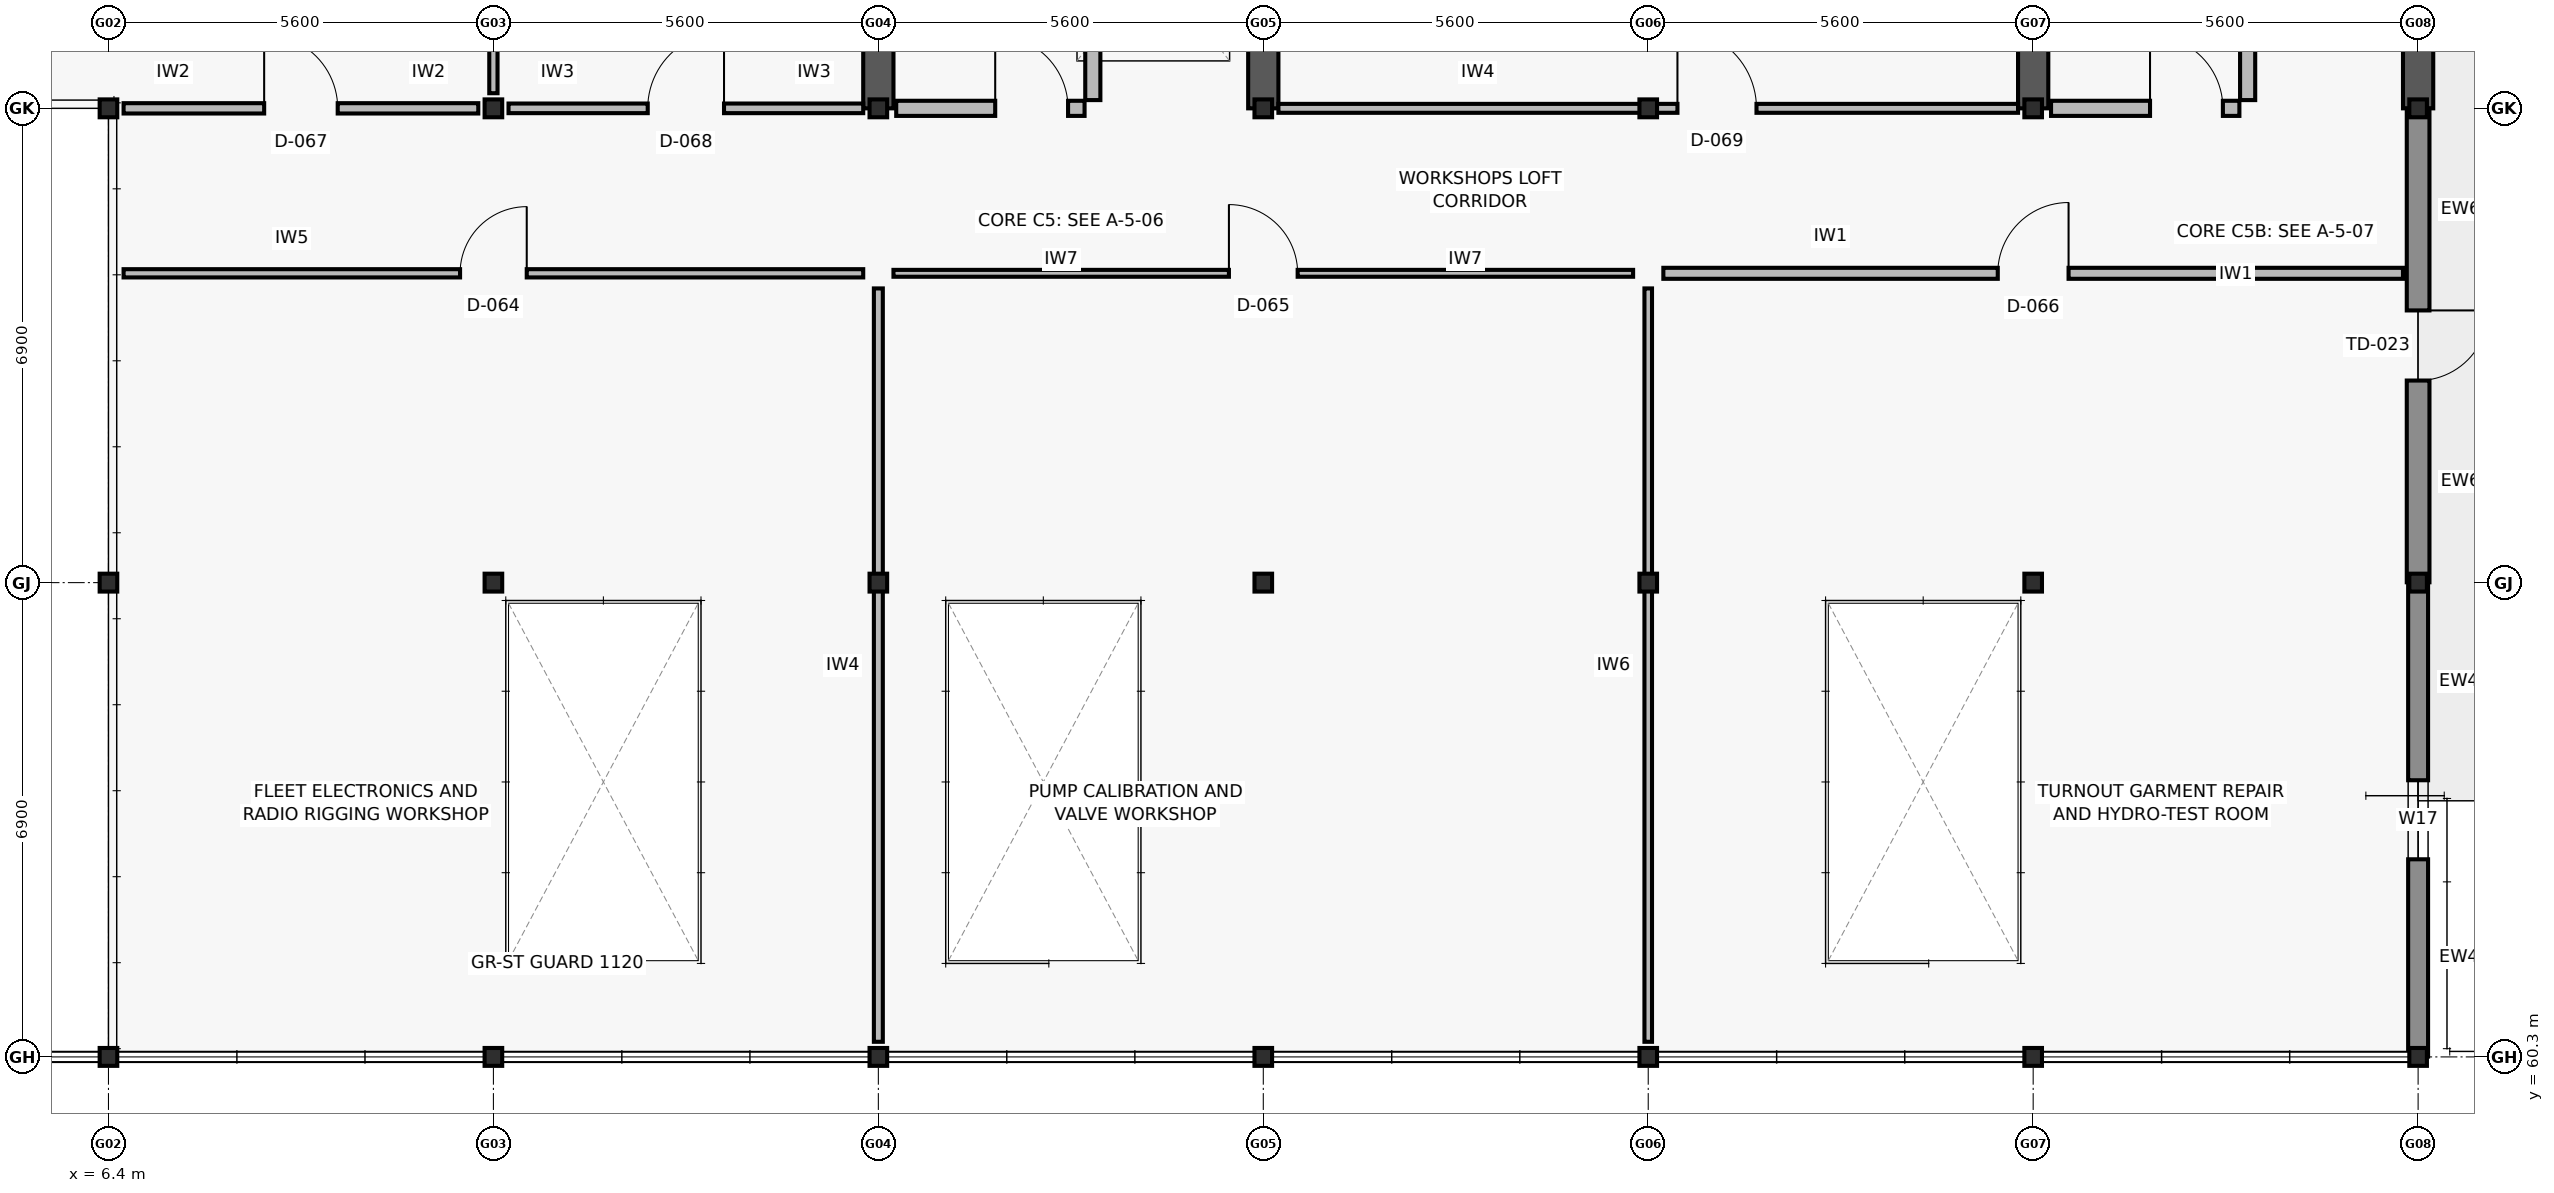
"""IFC4 building model, lengths in metres.
Left out: names, types, materials, properties, quantities, classifications, styles, units other than length and angle.
Written with IfcOpenShell. Run it as: python <this file> out.ifc"""

import sys

from ifc_helpers import new_model, si_unit, direction, frame, frame_2d, origin, origin_2d, place, context, subcontext, project, spatial, rectangle, i_section, extrude, element, fill, save


model = new_model("IFC4")
c1 = context("Model", 3, precision=1e-05, world=origin(), true_north=direction((0.0, 1.0)))
c2 = subcontext(c1, "Body", "Model", "MODEL_VIEW")
j1 = project(units=[si_unit("LENGTHUNIT", "METRE"), si_unit("PLANEANGLEUNIT", "RADIAN")], contexts=[c1])
p1 = place(None, origin())
s1 = spatial("IfcSite", under=j1, at=p1, CompositionType="ELEMENT")
p2 = place(p1, origin())
s2 = spatial("IfcBuilding", under=s1, at=p2, CompositionType="ELEMENT")
p3 = place(p2, frame((0.0, 0.0, 5.4)))
s3 = spatial("IfcBuildingStorey", under=s2, at=p3, CompositionType="ELEMENT", Elevation=5.4)
for number, where, z_axis, x_axis in (
    (1, (6.4, 60.3, 0.0), (0.0, 0.0, 1.0), (1.0, 0.0, 0.0)),
    (2, (6.4, 67.2, 0.0), (0.0, 0.0, 1.0), (1.0, 0.0, 0.0)),
    (3, (6.4, 74.1, 0.0), (0.0, 0.0, 1.0), (1.0, 0.0, 0.0)),
    (4, (12.0, 60.3, 0.0), (0.0, 0.0, 1.0), (1.0, 0.0, 0.0)),
    (5, (12.0, 67.2, 0.0), (0.0, 0.0, 1.0), (1.0, 0.0, 0.0)),
    (6, (12.0, 74.1, 0.0), (0.0, 0.0, 1.0), (1.0, 0.0, 0.0)),
    (7, (17.6, 60.3, 0.0), (0.0, 0.0, 1.0), (1.0, 0.0, 0.0)),
    (8, (17.6, 67.2, 0.0), (0.0, 0.0, 1.0), (1.0, 0.0, 0.0)),
    (9, (17.6, 74.1, 0.0), (0.0, 0.0, 1.0), (1.0, 0.0, 0.0)),
    (10, (23.2, 60.3, 0.0), (0.0, 0.0, 1.0), (1.0, 0.0, 0.0)),
    (11, (23.2, 67.2, 0.0), (0.0, 0.0, 1.0), (1.0, 0.0, 0.0)),
    (12, (23.2, 74.1, 0.0), (0.0, 0.0, 1.0), (1.0, 0.0, 0.0)),
    (13, (28.8, 60.3, 0.0), (0.0, 0.0, 1.0), (1.0, 0.0, 0.0)),
    (14, (28.8, 67.2, 0.0), (0.0, 0.0, 1.0), (1.0, 0.0, 0.0)),
    (15, (28.8, 74.1, 0.0), (0.0, 0.0, 1.0), (1.0, 0.0, 0.0)),
    (16, (34.4, 60.3, 0.0), (0.0, 0.0, 1.0), (1.0, 0.0, 0.0)),
    (17, (34.4, 67.2, 0.0), (0.0, 0.0, 1.0), (1.0, 0.0, 0.0)),
    (18, (34.4, 74.1, 0.0), (0.0, 0.0, 1.0), (1.0, 0.0, 0.0)),
    (19, (40.0, 60.3, 0.0), (0.0, 0.0, 1.0), (1.0, 0.0, 0.0)),
    (20, (40.0, 67.2, 0.0), (0.0, 0.0, 1.0), (1.0, 0.0, 0.0)),
    (21, (40.0, 74.1, 0.0), (0.0, 0.0, 1.0), (1.0, 0.0, 0.0)),
):
    element("IfcColumn", number, at=place(p3, frame(where, z_axis=z_axis, x_axis=x_axis)), inside=s3, PredefinedType="COLUMN", context=c2, shape_type="SweptSolid", body=[
        extrude(i_section(OverallWidth=0.256, OverallDepth=0.26, WebThickness=0.01, FlangeThickness=0.017, FilletRadius=0.013, at=origin_2d()), origin(), (0.0, 0.0, 1.0), 4.2),
    ])
for number, where, z_axis, x_axis in (
    (22, (17.6, 74.1, 0.0), (0.0, 0.0, 1.0), (0.0, 1.0, 0.0)),
    (23, (23.2, 74.1, 0.0), (0.0, 0.0, 1.0), (0.0, 1.0, 0.0)),
    (24, (34.4, 74.1, 0.0), (0.0, 0.0, 1.0), (0.0, 1.0, 0.0)),
    (25, (40.0, 74.1, 0.0), (0.0, 0.0, 1.0), (0.0, 1.0, 0.0)),
):
    element("IfcWall", number, at=place(p3, frame(where, z_axis=z_axis, x_axis=x_axis)), inside=s3, PredefinedType="SHEAR", context=c2, shape_type="SweptSolid", body=[
        extrude(rectangle(XDim=6.68, YDim=0.44, at=frame_2d((3.34, 0.0))), origin(), (0.0, 0.0, 1.0), 3.96),
    ])
p4 = place(p3, frame((40.0, 67.195, 0.0), z_axis=(0.0, 0.0, 1.0), x_axis=(0.0, -1.0, 0.0)))
e26 = element("IfcWall", 26, at=p4, inside=s3, PredefinedType="SOLIDWALL", context=c2, shape_type="SweptSolid", body=[
    extrude(rectangle(XDim=6.89, YDim=0.29, at=frame_2d((3.445, 0.0))), origin(), (0.0, 0.0, 1.0), 3.32),
])
p5 = place(p4, frame((2.87, 0.0, 0.8)))
e27 = element("IfcOpeningElement", 27, at=p5, cuts=e26, PredefinedType="OPENING", context=c2, shape_type="SweptSolid", body=[
    extrude(rectangle(XDim=1.15, YDim=1.8, at=frame_2d((0.575, 0.9))), frame((0.0, 0.155, 0.0), z_axis=(0.0, -1.0, 0.0), x_axis=(1.0, 0.0, 0.0)), (0.0, 0.0, 1.0), 0.31),
])
p6 = place(p3, frame((40.0, 74.095, 0.0), z_axis=(0.0, 0.0, 1.0), x_axis=(0.0, -1.0, 0.0)))
e28 = element("IfcWall", 28, at=p6, inside=s3, PredefinedType="SOLIDWALL", context=c2, shape_type="SweptSolid", body=[
    extrude(rectangle(XDim=6.89, YDim=0.33, at=frame_2d((3.445, 0.0))), origin(), (0.0, 0.0, 1.0), 3.32),
])
p7 = place(p6, frame((2.935, 0.0, 0.0)))
e29 = element("IfcOpeningElement", 29, at=p7, cuts=e28, PredefinedType="OPENING", context=c2, shape_type="SweptSolid", body=[
    extrude(rectangle(XDim=1.02, YDim=2.14, at=frame_2d((0.51, 1.07))), frame((0.0, 0.175, 0.0), z_axis=(0.0, -1.0, 0.0), x_axis=(1.0, 0.0, 0.0)), (0.0, 0.0, 1.0), 0.35),
])
p8 = place(p3, frame((20.72, 74.22, 0.0), z_axis=(0.0, 0.0, 1.0), x_axis=(0.0, 1.0, 0.0)))
e30 = element("IfcWall", 30, at=p8, inside=s3, PredefinedType="SOLIDWALL", context=c2, shape_type="SweptSolid", body=[
    extrude(rectangle(XDim=6.555, YDim=0.22, at=frame_2d((3.277, 0.0))), origin(), (0.0, 0.0, 1.0), 3.96),
])
p9 = place(p3, frame((17.86, 74.1, 0.0), z_axis=(0.0, 0.0, 1.0), x_axis=(1.0, 0.0, 0.0)))
e31 = element("IfcWall", 31, at=p9, inside=s3, PredefinedType="SOLIDWALL", context=c2, shape_type="SweptSolid", body=[
    extrude(rectangle(XDim=2.74, YDim=0.22, at=frame_2d((1.37, 0.0))), origin(), (0.0, 0.0, 1.0), 3.32),
])
p10 = place(p9, frame((1.44, 0.0, 0.0)))
e32 = element("IfcOpeningElement", 32, at=p10, cuts=e31, PredefinedType="OPENING", context=c2, shape_type="SweptSolid", body=[
    extrude(rectangle(XDim=1.06, YDim=2.1, at=frame_2d((0.53, 1.05))), frame((0.0, 0.12, 0.0), z_axis=(0.0, -1.0, 0.0), x_axis=(1.0, 0.0, 0.0)), (0.0, 0.0, 1.0), 0.24),
])
p11 = place(p3, frame((37.52, 74.22, 0.0), z_axis=(0.0, 0.0, 1.0), x_axis=(0.0, 1.0, 0.0)))
e33 = element("IfcWall", 33, at=p11, inside=s3, PredefinedType="SOLIDWALL", context=c2, shape_type="SweptSolid", body=[
    extrude(rectangle(XDim=6.555, YDim=0.22, at=frame_2d((3.277, 0.0))), origin(), (0.0, 0.0, 1.0), 3.96),
])
p12 = place(p3, frame((34.66, 74.1, 0.0), z_axis=(0.0, 0.0, 1.0), x_axis=(1.0, 0.0, 0.0)))
e34 = element("IfcWall", 34, at=p12, inside=s3, PredefinedType="SOLIDWALL", context=c2, shape_type="SweptSolid", body=[
    extrude(rectangle(XDim=2.74, YDim=0.22, at=frame_2d((1.37, 0.0))), origin(), (0.0, 0.0, 1.0), 3.32),
])
p13 = place(p12, frame((1.44, 0.0, 0.0)))
e35 = element("IfcOpeningElement", 35, at=p13, cuts=e34, PredefinedType="OPENING", context=c2, shape_type="SweptSolid", body=[
    extrude(rectangle(XDim=1.06, YDim=2.1, at=frame_2d((0.53, 1.05))), frame((0.0, 0.12, 0.0), z_axis=(0.0, -1.0, 0.0), x_axis=(1.0, 0.0, 0.0)), (0.0, 0.0, 1.0), 0.24),
])
p14 = place(p3, frame((17.6, 60.52, 0.0), z_axis=(0.0, 0.0, 1.0), x_axis=(0.0, 1.0, 0.0)))
e36 = element("IfcWall", 36, at=p14, inside=s3, PredefinedType="PARTITIONING", context=c2, shape_type="SweptSolid", body=[
    extrude(rectangle(XDim=10.96, YDim=0.13, at=frame_2d((5.48, 0.0))), origin(), (0.0, 0.0, 1.0), 3.3),
])
p15 = place(p3, frame((6.62, 71.7, 0.0), z_axis=(0.0, 0.0, 1.0), x_axis=(1.0, 0.0, 0.0)))
e37 = element("IfcWall", 37, at=p15, inside=s3, PredefinedType="PARTITIONING", context=c2, shape_type="SweptSolid", body=[
    extrude(rectangle(XDim=10.76, YDim=0.12, at=frame_2d((5.38, 0.0))), origin(), (0.0, 0.0, 1.0), 3.3),
])
p16 = place(p15, frame((4.895, 0.0, 0.0)))
e38 = element("IfcOpeningElement", 38, at=p16, cuts=e37, PredefinedType="OPENING", context=c2, shape_type="SweptSolid", body=[
    extrude(rectangle(XDim=0.97, YDim=2.1, at=frame_2d((0.485, 1.05))), frame((0.0, 0.07, 0.0), z_axis=(0.0, -1.0, 0.0), x_axis=(1.0, 0.0, 0.0)), (0.0, 0.0, 1.0), 0.14),
])
p17 = place(p3, frame((28.8, 60.52, 0.0), z_axis=(0.0, 0.0, 1.0), x_axis=(0.0, 1.0, 0.0)))
e39 = element("IfcWall", 39, at=p17, inside=s3, PredefinedType="PARTITIONING", context=c2, shape_type="SweptSolid", body=[
    extrude(rectangle(XDim=10.96, YDim=0.11, at=frame_2d((5.48, 0.0))), origin(), (0.0, 0.0, 1.0), 3.3),
])
p18 = place(p3, frame((17.82, 71.7, 0.0), z_axis=(0.0, 0.0, 1.0), x_axis=(1.0, 0.0, 0.0)))
e40 = element("IfcWall", 40, at=p18, inside=s3, PredefinedType="PARTITIONING", context=c2, shape_type="SweptSolid", body=[
    extrude(rectangle(XDim=10.76, YDim=0.1, at=frame_2d((5.38, 0.0))), origin(), (0.0, 0.0, 1.0), 3.3),
])
p19 = place(p18, frame((4.88, 0.0, 0.0)))
e41 = element("IfcOpeningElement", 41, at=p19, cuts=e40, PredefinedType="OPENING", context=c2, shape_type="SweptSolid", body=[
    extrude(rectangle(XDim=1.0, YDim=2.12, at=frame_2d((0.5, 1.06))), frame((0.0, 0.06, 0.0), z_axis=(0.0, -1.0, 0.0), x_axis=(1.0, 0.0, 0.0)), (0.0, 0.0, 1.0), 0.12),
])
p20 = place(p3, frame((29.02, 71.7, 0.0), z_axis=(0.0, 0.0, 1.0), x_axis=(1.0, 0.0, 0.0)))
e42 = element("IfcWall", 42, at=p20, inside=s3, PredefinedType="PARTITIONING", context=c2, shape_type="SweptSolid", body=[
    extrude(rectangle(XDim=10.76, YDim=0.16, at=frame_2d((5.38, 0.0))), origin(), (0.0, 0.0, 1.0), 3.3),
])
p21 = place(p20, frame((4.865, 0.0, 0.0)))
e43 = element("IfcOpeningElement", 43, at=p21, cuts=e42, PredefinedType="OPENING", context=c2, shape_type="SweptSolid", body=[
    extrude(rectangle(XDim=1.03, YDim=2.06, at=frame_2d((0.515, 1.03))), frame((0.0, 0.09, 0.0), z_axis=(0.0, -1.0, 0.0), x_axis=(1.0, 0.0, 0.0)), (0.0, 0.0, 1.0), 0.18),
])
p22 = place(p3, frame((6.62, 74.1, 0.0), z_axis=(0.0, 0.0, 1.0), x_axis=(1.0, 0.0, 0.0)))
e44 = element("IfcWall", 44, at=p22, inside=s3, PredefinedType="PARTITIONING", context=c2, shape_type="SweptSolid", body=[
    extrude(rectangle(XDim=5.16, YDim=0.15, at=frame_2d((2.58, 0.0))), origin(), (0.0, 0.0, 1.0), 3.3),
])
p23 = place(p22, frame((2.045, 0.0, 0.0)))
e45 = element("IfcOpeningElement", 45, at=p23, cuts=e44, PredefinedType="OPENING", context=c2, shape_type="SweptSolid", body=[
    extrude(rectangle(XDim=1.07, YDim=2.08, at=frame_2d((0.535, 1.04))), frame((0.0, 0.085, 0.0), z_axis=(0.0, -1.0, 0.0), x_axis=(1.0, 0.0, 0.0)), (0.0, 0.0, 1.0), 0.17),
])
p24 = place(p3, frame((12.22, 74.1, 0.0), z_axis=(0.0, 0.0, 1.0), x_axis=(1.0, 0.0, 0.0)))
e46 = element("IfcWall", 46, at=p24, inside=s3, PredefinedType="PARTITIONING", context=c2, shape_type="SweptSolid", body=[
    extrude(rectangle(XDim=5.16, YDim=0.14, at=frame_2d((2.58, 0.0))), origin(), (0.0, 0.0, 1.0), 3.3),
])
p25 = place(p24, frame((2.025, 0.0, 0.0)))
e47 = element("IfcOpeningElement", 47, at=p25, cuts=e46, PredefinedType="OPENING", context=c2, shape_type="SweptSolid", body=[
    extrude(rectangle(XDim=1.11, YDim=2.1, at=frame_2d((0.555, 1.05))), frame((0.0, 0.08, 0.0), z_axis=(0.0, -1.0, 0.0), x_axis=(1.0, 0.0, 0.0)), (0.0, 0.0, 1.0), 0.16),
])
p26 = place(p3, frame((23.42, 74.1, 0.0), z_axis=(0.0, 0.0, 1.0), x_axis=(1.0, 0.0, 0.0)))
e48 = element("IfcWall", 48, at=p26, inside=s3, PredefinedType="PARTITIONING", context=c2, shape_type="SweptSolid", body=[
    extrude(rectangle(XDim=10.76, YDim=0.13, at=frame_2d((5.38, 0.0))), origin(), (0.0, 0.0, 1.0), 3.3),
])
p27 = place(p26, frame((5.805, 0.0, 0.0)))
e49 = element("IfcOpeningElement", 49, at=p27, cuts=e48, PredefinedType="OPENING", context=c2, shape_type="SweptSolid", body=[
    extrude(rectangle(XDim=1.15, YDim=2.12, at=frame_2d((0.575, 1.06))), frame((0.0, 0.075, 0.0), z_axis=(0.0, -1.0, 0.0), x_axis=(1.0, 0.0, 0.0)), (0.0, 0.0, 1.0), 0.15),
])
p28 = place(p3, frame((12.0, 74.32, 0.0), z_axis=(0.0, 0.0, 1.0), x_axis=(0.0, 1.0, 0.0)))
e50 = element("IfcWall", 50, at=p28, inside=s3, PredefinedType="PARTITIONING", context=c2, shape_type="SweptSolid", body=[
    extrude(rectangle(XDim=6.46, YDim=0.12, at=frame_2d((3.23, 0.0))), origin(), (0.0, 0.0, 1.0), 3.3),
])
p29 = place(p5, origin())
e51 = element("IfcWindow", 51, at=p29, inside=s3, PartitioningType="SINGLE_PANEL", PredefinedType="WINDOW", context=c2, shape_type="SweptSolid", body=[
    extrude(rectangle(XDim=1.15, YDim=1.8, at=frame_2d((0.575, 0.9))), frame((0.0, 0.03, 0.0), z_axis=(0.0, -1.0, 0.0), x_axis=(1.0, 0.0, 0.0)), (0.0, 0.0, 1.0), 0.06),
])
fill(e27, e51)
p30 = place(p7, origin())
e52 = element("IfcDoor", 52, at=p30, inside=s3, OperationType="SINGLE_SWING_LEFT", PredefinedType="DOOR", context=c2, shape_type="SweptSolid", body=[
    extrude(rectangle(XDim=1.02, YDim=2.14, at=frame_2d((0.51, 1.07))), frame((0.0, 0.025, 0.0), z_axis=(0.0, -1.0, 0.0), x_axis=(1.0, 0.0, 0.0)), (0.0, 0.0, 1.0), 0.05),
])
fill(e29, e52)
p31 = place(p10, origin())
e53 = element("IfcDoor", 53, at=p31, inside=s3, OperationType="SINGLE_SWING_LEFT", PredefinedType="DOOR", context=c2, shape_type="SweptSolid", body=[
    extrude(rectangle(XDim=1.06, YDim=2.1, at=frame_2d((0.53, 1.05))), frame((0.0, 0.025, 0.0), z_axis=(0.0, -1.0, 0.0), x_axis=(1.0, 0.0, 0.0)), (0.0, 0.0, 1.0), 0.05),
])
fill(e32, e53)
p32 = place(p13, origin())
e54 = element("IfcDoor", 54, at=p32, inside=s3, OperationType="SINGLE_SWING_LEFT", PredefinedType="DOOR", context=c2, shape_type="SweptSolid", body=[
    extrude(rectangle(XDim=1.06, YDim=2.1, at=frame_2d((0.53, 1.05))), frame((0.0, 0.025, 0.0), z_axis=(0.0, -1.0, 0.0), x_axis=(1.0, 0.0, 0.0)), (0.0, 0.0, 1.0), 0.05),
])
fill(e35, e54)
p33 = place(p16, origin())
e55 = element("IfcDoor", 55, at=p33, inside=s3, OperationType="SINGLE_SWING_RIGHT", PredefinedType="DOOR", context=c2, shape_type="SweptSolid", body=[
    extrude(rectangle(XDim=0.97, YDim=2.1, at=frame_2d((0.485, 1.05))), frame((0.0, 0.025, 0.0), z_axis=(0.0, -1.0, 0.0), x_axis=(1.0, 0.0, 0.0)), (0.0, 0.0, 1.0), 0.05),
])
fill(e38, e55)
p34 = place(p19, origin())
e56 = element("IfcDoor", 56, at=p34, inside=s3, OperationType="SINGLE_SWING_LEFT", PredefinedType="DOOR", context=c2, shape_type="SweptSolid", body=[
    extrude(rectangle(XDim=1.0, YDim=2.12, at=frame_2d((0.5, 1.06))), frame((0.0, 0.025, 0.0), z_axis=(0.0, -1.0, 0.0), x_axis=(1.0, 0.0, 0.0)), (0.0, 0.0, 1.0), 0.05),
])
fill(e41, e56)
p35 = place(p21, origin())
e57 = element("IfcDoor", 57, at=p35, inside=s3, OperationType="SINGLE_SWING_RIGHT", PredefinedType="DOOR", context=c2, shape_type="SweptSolid", body=[
    extrude(rectangle(XDim=1.03, YDim=2.06, at=frame_2d((0.515, 1.03))), frame((0.0, 0.025, 0.0), z_axis=(0.0, -1.0, 0.0), x_axis=(1.0, 0.0, 0.0)), (0.0, 0.0, 1.0), 0.05),
])
fill(e43, e57)
p36 = place(p23, origin())
e58 = element("IfcDoor", 58, at=p36, inside=s3, OperationType="SINGLE_SWING_LEFT", PredefinedType="DOOR", context=c2, shape_type="SweptSolid", body=[
    extrude(rectangle(XDim=1.07, YDim=2.08, at=frame_2d((0.535, 1.04))), frame((0.0, 0.025, 0.0), z_axis=(0.0, -1.0, 0.0), x_axis=(1.0, 0.0, 0.0)), (0.0, 0.0, 1.0), 0.05),
])
fill(e45, e58)
p37 = place(p25, origin())
e59 = element("IfcDoor", 59, at=p37, inside=s3, OperationType="SINGLE_SWING_RIGHT", PredefinedType="DOOR", context=c2, shape_type="SweptSolid", body=[
    extrude(rectangle(XDim=1.11, YDim=2.1, at=frame_2d((0.555, 1.05))), frame((0.0, 0.025, 0.0), z_axis=(0.0, -1.0, 0.0), x_axis=(1.0, 0.0, 0.0)), (0.0, 0.0, 1.0), 0.05),
])
fill(e47, e59)
p38 = place(p27, origin())
e60 = element("IfcDoor", 60, at=p38, inside=s3, OperationType="SINGLE_SWING_LEFT", PredefinedType="DOOR", context=c2, shape_type="SweptSolid", body=[
    extrude(rectangle(XDim=1.15, YDim=2.12, at=frame_2d((0.575, 1.06))), frame((0.0, 0.025, 0.0), z_axis=(0.0, -1.0, 0.0), x_axis=(1.0, 0.0, 0.0)), (0.0, 0.0, 1.0), 0.05),
])
fill(e49, e60)
save(model, sys.argv[1])
